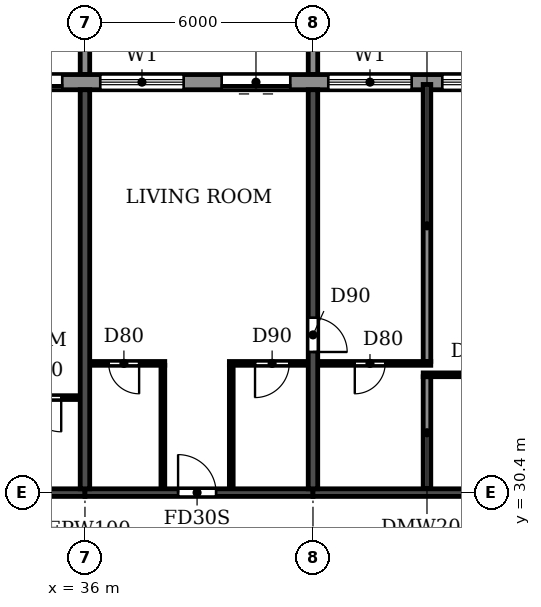
"""IFC4 building model, lengths in metres.
Left out: names, types, materials, properties, quantities, classifications, styles, units other than length and angle.
Written with IfcOpenShell. Run it as: python <this file> out.ifc"""

import sys

from ifc_helpers import new_model, si_unit, direction, frame, frame_2d, origin, place, context, subcontext, project, spatial, polyline, rectangle, outline, extrude, source, transform, mapped, element, fill, save


model = new_model("IFC4")
c1 = context("Model", 3, precision=1e-05, world=origin(), true_north=direction((0.0, 1.0)))
c2 = subcontext(c1, "Body", "Model", "MODEL_VIEW")
j1 = project(units=[si_unit("LENGTHUNIT", "METRE"), si_unit("PLANEANGLEUNIT", "RADIAN")], contexts=[c1])
p1 = place(None, origin())
s1 = spatial("IfcSite", under=j1, at=p1, CompositionType="ELEMENT")
p2 = place(p1, origin())
s2 = spatial("IfcBuilding", under=s1, at=p2, CompositionType="ELEMENT")
p3 = place(p2, frame((0.0, 0.0, 251.1)))
s3 = spatial("IfcBuildingStorey", under=s2, at=p3, CompositionType="ELEMENT", Elevation=251.1)
p4 = place(p3, frame((36.0, 30.5, 0.0), z_axis=(0.0, 0.0, 1.0), x_axis=(0.0, 1.0, 0.0)))
e1 = element("IfcWall", 1, at=p4, inside=s3, PredefinedType="SHEAR", context=c2, shape_type="SweptSolid", body=[
    extrude(rectangle(XDim=10.5, YDim=0.25, at=frame_2d((5.25, 0.0))), origin(), (0.0, 0.0, 1.0), 3.08),
])
p5 = place(p3, frame((42.0, 30.5, 0.0), z_axis=(0.0, 0.0, 1.0), x_axis=(0.0, 1.0, 0.0)))
e2 = element("IfcWall", 2, at=p5, inside=s3, PredefinedType="SHEAR", context=c2, shape_type="SweptSolid", body=[
    extrude(rectangle(XDim=10.5, YDim=0.25, at=frame_2d((5.25, 0.0))), origin(), (0.0, 0.0, 1.0), 3.08),
])
p6 = place(p5, frame((3.6, 0.0, 0.0)))
e3 = element("IfcOpeningElement", 3, at=p6, cuts=e2, PredefinedType="OPENING", context=c2, shape_type="SweptSolid", body=[
    extrude(rectangle(XDim=0.9, YDim=2.1, at=frame_2d((0.45, 1.05))), frame((0.0, 0.135, 0.0), z_axis=(0.0, -1.0, 0.0), x_axis=(1.0, 0.0, 0.0)), (0.0, 0.0, 1.0), 0.27),
])
p7 = place(p3, frame((30.0, 30.4, 0.0), z_axis=(0.0, 0.0, 1.0), x_axis=(1.0, 0.0, 0.0)))
e4 = element("IfcWall", 4, at=p7, inside=s3, PredefinedType="SHEAR", context=c2, shape_type="SweptSolid", body=[
    extrude(rectangle(XDim=6.0, YDim=0.2, at=frame_2d((3.0, 0.0))), origin(), (0.0, 0.0, 1.0), 2.48),
])
p8 = place(p7, frame((2.45, 0.0, 0.0)))
e5 = element("IfcOpeningElement", 5, at=p8, cuts=e4, PredefinedType="OPENING", context=c2, shape_type="SweptSolid", body=[
    extrude(rectangle(XDim=1.0, YDim=2.1, at=frame_2d((0.5, 1.05))), frame((0.0, 0.11, 0.0), z_axis=(0.0, -1.0, 0.0), x_axis=(1.0, 0.0, 0.0)), (0.0, 0.0, 1.0), 0.22),
])
p9 = place(p3, frame((36.0, 30.4, 0.0), z_axis=(0.0, 0.0, 1.0), x_axis=(1.0, 0.0, 0.0)))
e6 = element("IfcWall", 6, at=p9, inside=s3, PredefinedType="SHEAR", context=c2, shape_type="SweptSolid", body=[
    extrude(rectangle(XDim=6.0, YDim=0.2, at=frame_2d((3.0, 0.0))), origin(), (0.0, 0.0, 1.0), 2.48),
])
p10 = place(p9, frame((2.45, 0.0, 0.0)))
e7 = element("IfcOpeningElement", 7, at=p10, cuts=e6, PredefinedType="OPENING", context=c2, shape_type="SweptSolid", body=[
    extrude(rectangle(XDim=1.0, YDim=2.1, at=frame_2d((0.5, 1.05))), frame((0.0, 0.11, 0.0), z_axis=(0.0, -1.0, 0.0), x_axis=(1.0, 0.0, 0.0)), (0.0, 0.0, 1.0), 0.22),
])
p11 = place(p3, frame((42.0, 30.4, 0.0), z_axis=(0.0, 0.0, 1.0), x_axis=(1.0, 0.0, 0.0)))
e8 = element("IfcWall", 8, at=p11, inside=s3, PredefinedType="SHEAR", context=c2, shape_type="SweptSolid", body=[
    extrude(rectangle(XDim=6.0, YDim=0.2, at=frame_2d((3.0, 0.0))), origin(), (0.0, 0.0, 1.0), 2.48),
])
p12 = place(p3, frame((79.317, 41.2, 0.0), z_axis=(0.0, 0.0, 1.0), x_axis=(-1.0, 0.0, 0.0)))
e9 = element("IfcWall", 9, at=p12, inside=s3, PredefinedType="STANDARD", context=c2, shape_type="SweptSolid", body=[
    extrude(rectangle(XDim=56.634, YDim=0.4, at=frame_2d((28.317, 0.0))), origin(), (0.0, 0.0, 1.0), 3.08),
])
p13 = place(p12, frame((52.717, 0.0, 0.9)))
e10 = element("IfcOpeningElement", 10, at=p13, cuts=e9, PredefinedType="OPENING", context=c2, shape_type="SweptSolid", body=[
    extrude(rectangle(XDim=2.2, YDim=1.5, at=frame_2d((1.1, 0.75))), frame((0.0, 0.21, 0.0), z_axis=(0.0, -1.0, 0.0), x_axis=(1.0, 0.0, 0.0)), (0.0, 0.0, 1.0), 0.42),
])
p14 = place(p12, frame((49.717, 0.0, 0.9)))
e11 = element("IfcOpeningElement", 11, at=p14, cuts=e9, PredefinedType="OPENING", context=c2, shape_type="SweptSolid", body=[
    extrude(rectangle(XDim=2.2, YDim=1.5, at=frame_2d((1.1, 0.75))), frame((0.0, 0.21, 0.0), z_axis=(0.0, -1.0, 0.0), x_axis=(1.0, 0.0, 0.0)), (0.0, 0.0, 1.0), 0.42),
])
p15 = place(p12, frame((46.717, 0.0, 0.9)))
e12 = element("IfcOpeningElement", 12, at=p15, cuts=e9, PredefinedType="OPENING", context=c2, shape_type="SweptSolid", body=[
    extrude(rectangle(XDim=2.2, YDim=1.5, at=frame_2d((1.1, 0.75))), frame((0.0, 0.21, 0.0), z_axis=(0.0, -1.0, 0.0), x_axis=(1.0, 0.0, 0.0)), (0.0, 0.0, 1.0), 0.42),
])
p16 = place(p12, frame((43.917, 0.0, 0.0)))
e13 = element("IfcOpeningElement", 13, at=p16, cuts=e9, PredefinedType="OPENING", context=c2, shape_type="SweptSolid", body=[
    extrude(rectangle(XDim=1.8, YDim=2.4, at=frame_2d((0.9, 1.2))), frame((0.0, 0.21, 0.0), z_axis=(0.0, -1.0, 0.0), x_axis=(1.0, 0.0, 0.0)), (0.0, 0.0, 1.0), 0.42),
])
p17 = place(p12, frame((40.717, 0.0, 0.9)))
e14 = element("IfcOpeningElement", 14, at=p17, cuts=e9, PredefinedType="OPENING", context=c2, shape_type="SweptSolid", body=[
    extrude(rectangle(XDim=2.2, YDim=1.5, at=frame_2d((1.1, 0.75))), frame((0.0, 0.21, 0.0), z_axis=(0.0, -1.0, 0.0), x_axis=(1.0, 0.0, 0.0)), (0.0, 0.0, 1.0), 0.42),
])
p18 = place(p12, frame((37.917, 0.0, 0.0)))
e15 = element("IfcOpeningElement", 15, at=p18, cuts=e9, PredefinedType="OPENING", context=c2, shape_type="SweptSolid", body=[
    extrude(rectangle(XDim=1.8, YDim=2.4, at=frame_2d((0.9, 1.2))), frame((0.0, 0.21, 0.0), z_axis=(0.0, -1.0, 0.0), x_axis=(1.0, 0.0, 0.0)), (0.0, 0.0, 1.0), 0.42),
])
p19 = place(p12, frame((34.717, 0.0, 0.9)))
e16 = element("IfcOpeningElement", 16, at=p19, cuts=e9, PredefinedType="OPENING", context=c2, shape_type="SweptSolid", body=[
    extrude(rectangle(XDim=2.2, YDim=1.5, at=frame_2d((1.1, 0.75))), frame((0.0, 0.21, 0.0), z_axis=(0.0, -1.0, 0.0), x_axis=(1.0, 0.0, 0.0)), (0.0, 0.0, 1.0), 0.42),
])
p20 = place(p12, frame((31.717, 0.0, 0.9)))
e17 = element("IfcOpeningElement", 17, at=p20, cuts=e9, PredefinedType="OPENING", context=c2, shape_type="SweptSolid", body=[
    extrude(rectangle(XDim=2.2, YDim=1.5, at=frame_2d((1.1, 0.75))), frame((0.0, 0.21, 0.0), z_axis=(0.0, -1.0, 0.0), x_axis=(1.0, 0.0, 0.0)), (0.0, 0.0, 1.0), 0.42),
])
p21 = place(p12, frame((28.717, 0.0, 0.9)))
e18 = element("IfcOpeningElement", 18, at=p21, cuts=e9, PredefinedType="OPENING", context=c2, shape_type="SweptSolid", body=[
    extrude(rectangle(XDim=2.2, YDim=1.5, at=frame_2d((1.1, 0.75))), frame((0.0, 0.21, 0.0), z_axis=(0.0, -1.0, 0.0), x_axis=(1.0, 0.0, 0.0)), (0.0, 0.0, 1.0), 0.42),
])
p22 = place(p12, frame((25.917, 0.0, 0.0)))
e19 = element("IfcOpeningElement", 19, at=p22, cuts=e9, PredefinedType="OPENING", context=c2, shape_type="SweptSolid", body=[
    extrude(rectangle(XDim=1.8, YDim=2.4, at=frame_2d((0.9, 1.2))), frame((0.0, 0.21, 0.0), z_axis=(0.0, -1.0, 0.0), x_axis=(1.0, 0.0, 0.0)), (0.0, 0.0, 1.0), 0.42),
])
p23 = place(p12, frame((22.917, 0.0, 0.0)))
e20 = element("IfcOpeningElement", 20, at=p23, cuts=e9, PredefinedType="OPENING", context=c2, shape_type="SweptSolid", body=[
    extrude(rectangle(XDim=1.8, YDim=2.4, at=frame_2d((0.9, 1.2))), frame((0.0, 0.21, 0.0), z_axis=(0.0, -1.0, 0.0), x_axis=(1.0, 0.0, 0.0)), (0.0, 0.0, 1.0), 0.42),
])
p24 = place(p12, frame((19.717, 0.0, 0.9)))
e21 = element("IfcOpeningElement", 21, at=p24, cuts=e9, PredefinedType="OPENING", context=c2, shape_type="SweptSolid", body=[
    extrude(rectangle(XDim=2.2, YDim=1.5, at=frame_2d((1.1, 0.75))), frame((0.0, 0.21, 0.0), z_axis=(0.0, -1.0, 0.0), x_axis=(1.0, 0.0, 0.0)), (0.0, 0.0, 1.0), 0.42),
])
p25 = place(p12, frame((16.717, 0.0, 0.9)))
e22 = element("IfcOpeningElement", 22, at=p25, cuts=e9, PredefinedType="OPENING", context=c2, shape_type="SweptSolid", body=[
    extrude(rectangle(XDim=2.2, YDim=1.5, at=frame_2d((1.1, 0.75))), frame((0.0, 0.21, 0.0), z_axis=(0.0, -1.0, 0.0), x_axis=(1.0, 0.0, 0.0)), (0.0, 0.0, 1.0), 0.42),
])
p26 = place(p12, frame((13.717, 0.0, 0.9)))
e23 = element("IfcOpeningElement", 23, at=p26, cuts=e9, PredefinedType="OPENING", context=c2, shape_type="SweptSolid", body=[
    extrude(rectangle(XDim=2.2, YDim=1.5, at=frame_2d((1.1, 0.75))), frame((0.0, 0.21, 0.0), z_axis=(0.0, -1.0, 0.0), x_axis=(1.0, 0.0, 0.0)), (0.0, 0.0, 1.0), 0.42),
])
p27 = place(p12, frame((10.717, 0.0, 0.9)))
e24 = element("IfcOpeningElement", 24, at=p27, cuts=e9, PredefinedType="OPENING", context=c2, shape_type="SweptSolid", body=[
    extrude(rectangle(XDim=2.2, YDim=1.5, at=frame_2d((1.1, 0.75))), frame((0.0, 0.21, 0.0), z_axis=(0.0, -1.0, 0.0), x_axis=(1.0, 0.0, 0.0)), (0.0, 0.0, 1.0), 0.42),
])
p28 = place(p12, frame((7.917, 0.0, 0.0)))
e25 = element("IfcOpeningElement", 25, at=p28, cuts=e9, PredefinedType="OPENING", context=c2, shape_type="SweptSolid", body=[
    extrude(rectangle(XDim=1.8, YDim=2.4, at=frame_2d((0.9, 1.2))), frame((0.0, 0.21, 0.0), z_axis=(0.0, -1.0, 0.0), x_axis=(1.0, 0.0, 0.0)), (0.0, 0.0, 1.0), 0.42),
])
p29 = place(p12, frame((4.717, 0.0, 0.9)))
e26 = element("IfcOpeningElement", 26, at=p29, cuts=e9, PredefinedType="OPENING", context=c2, shape_type="SweptSolid", body=[
    extrude(rectangle(XDim=2.2, YDim=1.5, at=frame_2d((1.1, 0.75))), frame((0.0, 0.21, 0.0), z_axis=(0.0, -1.0, 0.0), x_axis=(1.0, 0.0, 0.0)), (0.0, 0.0, 1.0), 0.42),
])
p30 = place(p12, frame((1.917, 0.0, 0.0)))
e27 = element("IfcOpeningElement", 27, at=p30, cuts=e9, PredefinedType="OPENING", context=c2, shape_type="SweptSolid", body=[
    extrude(rectangle(XDim=1.8, YDim=2.4, at=frame_2d((0.9, 1.2))), frame((0.0, 0.21, 0.0), z_axis=(0.0, -1.0, 0.0), x_axis=(1.0, 0.0, 0.0)), (0.0, 0.0, 1.0), 0.42),
])
m1 = source(origin(), c2, "Body", "SweptSolid", [
    extrude(outline(polyline([(0.0, 0.0), (0.25, 0.0), (0.25, 3.1), (0.0, 3.1), (0.0, 0.0)])), origin(), (0.0, 0.0, 1.0), 3.1),
])
for number, where in (
    (28, (35.875, 41.4, 0.0)),
    (29, (41.875, 41.4, 0.0)),
):
    element("IfcWall", number, at=place(p3, frame(where)), inside=s3, PredefinedType="STANDARD", context=c2, shape_type="MappedRepresentation", body=[
        mapped(m1, transform((0.0, 0.0, 0.0))),
    ])
p31 = place(p3, frame((45.0, 30.51, 0.0), z_axis=(0.0, 0.0, 1.0), x_axis=(0.0, 1.0, 0.0)))
e30 = element("IfcWall", 30, at=p31, inside=s3, PredefinedType="PARTITIONING", context=c2, shape_type="SweptSolid", body=[
    extrude(rectangle(XDim=2.94, YDim=0.2, at=frame_2d((1.47, 0.0))), origin(), (0.0, 0.0, 1.0), 3.08),
])
p32 = place(p3, frame((45.0, 33.85, 0.0), z_axis=(0.0, 0.0, 1.0), x_axis=(0.0, 1.0, 0.0)))
e31 = element("IfcWall", 31, at=p32, inside=s3, PredefinedType="PARTITIONING", context=c2, shape_type="SweptSolid", body=[
    extrude(rectangle(XDim=7.29, YDim=0.2, at=frame_2d((3.645, 0.0))), origin(), (0.0, 0.0, 1.0), 3.08),
])
p33 = place(p3, frame((33.8, 32.9, 0.0), z_axis=(0.0, 0.0, 1.0), x_axis=(1.0, 0.0, 0.0)))
e32 = element("IfcWall", 32, at=p33, inside=s3, PredefinedType="PARTITIONING", context=c2, shape_type="SweptSolid", body=[
    extrude(rectangle(XDim=2.065, YDim=0.1, at=frame_2d((1.032, 0.0))), origin(), (0.0, 0.0, 1.0), 3.08),
])
p34 = place(p33, frame((0.675, 0.0, 0.0)))
e33 = element("IfcOpeningElement", 33, at=p34, cuts=e32, PredefinedType="OPENING", context=c2, shape_type="SweptSolid", body=[
    extrude(rectangle(XDim=0.9, YDim=2.1, at=frame_2d((0.45, 1.05))), frame((0.0, 0.06, 0.0), z_axis=(0.0, -1.0, 0.0), x_axis=(1.0, 0.0, 0.0)), (0.0, 0.0, 1.0), 0.12),
])
p35 = place(p3, frame((44.9, 33.5, 0.0), z_axis=(0.0, 0.0, 1.0), x_axis=(1.0, 0.0, 0.0)))
e34 = element("IfcWall", 34, at=p35, inside=s3, PredefinedType="PARTITIONING", context=c2, shape_type="SweptSolid", body=[
    extrude(rectangle(XDim=2.965, YDim=0.1, at=frame_2d((1.482, 0.0))), origin(), (0.0, 0.0, 1.0), 3.08),
])
p36 = place(p35, frame((1.2, 0.0, 0.0)))
e35 = element("IfcOpeningElement", 35, at=p36, cuts=e34, PredefinedType="OPENING", context=c2, shape_type="SweptSolid", body=[
    extrude(rectangle(XDim=0.8, YDim=2.1, at=frame_2d((0.4, 1.05))), frame((0.0, 0.06, 0.0), z_axis=(0.0, -1.0, 0.0), x_axis=(1.0, 0.0, 0.0)), (0.0, 0.0, 1.0), 0.12),
])
p37 = place(p3, frame((36.135, 33.8, 0.0), z_axis=(0.0, 0.0, 1.0), x_axis=(1.0, 0.0, 0.0)))
e36 = element("IfcWall", 36, at=p37, inside=s3, PredefinedType="PARTITIONING", context=c2, shape_type="SweptSolid", body=[
    extrude(rectangle(XDim=1.965, YDim=0.1, at=frame_2d((0.982, 0.0))), origin(), (0.0, 0.0, 1.0), 3.08),
])
p38 = place(p37, frame((0.49, 0.0, 0.0)))
e37 = element("IfcOpeningElement", 37, at=p38, cuts=e36, PredefinedType="OPENING", context=c2, shape_type="SweptSolid", body=[
    extrude(rectangle(XDim=0.8, YDim=2.1, at=frame_2d((0.4, 1.05))), frame((0.0, 0.06, 0.0), z_axis=(0.0, -1.0, 0.0), x_axis=(1.0, 0.0, 0.0)), (0.0, 0.0, 1.0), 0.12),
])
p39 = place(p3, frame((39.8, 33.8, 0.0), z_axis=(0.0, 0.0, 1.0), x_axis=(1.0, 0.0, 0.0)))
e38 = element("IfcWall", 38, at=p39, inside=s3, PredefinedType="PARTITIONING", context=c2, shape_type="SweptSolid", body=[
    extrude(rectangle(XDim=2.065, YDim=0.1, at=frame_2d((1.032, 0.0))), origin(), (0.0, 0.0, 1.0), 3.08),
])
p40 = place(p39, frame((0.675, 0.0, 0.0)))
e39 = element("IfcOpeningElement", 39, at=p40, cuts=e38, PredefinedType="OPENING", context=c2, shape_type="SweptSolid", body=[
    extrude(rectangle(XDim=0.9, YDim=2.1, at=frame_2d((0.45, 1.05))), frame((0.0, 0.06, 0.0), z_axis=(0.0, -1.0, 0.0), x_axis=(1.0, 0.0, 0.0)), (0.0, 0.0, 1.0), 0.12),
])
p41 = place(p3, frame((42.135, 33.8, 0.0), z_axis=(0.0, 0.0, 1.0), x_axis=(1.0, 0.0, 0.0)))
e40 = element("IfcWall", 40, at=p41, inside=s3, PredefinedType="PARTITIONING", context=c2, shape_type="SweptSolid", body=[
    extrude(rectangle(XDim=2.965, YDim=0.1, at=frame_2d((1.482, 0.0))), origin(), (0.0, 0.0, 1.0), 3.08),
])
p42 = place(p41, frame((0.965, 0.0, 0.0)))
e41 = element("IfcOpeningElement", 41, at=p42, cuts=e40, PredefinedType="OPENING", context=c2, shape_type="SweptSolid", body=[
    extrude(rectangle(XDim=0.8, YDim=2.1, at=frame_2d((0.4, 1.05))), frame((0.0, 0.06, 0.0), z_axis=(0.0, -1.0, 0.0), x_axis=(1.0, 0.0, 0.0)), (0.0, 0.0, 1.0), 0.12),
])
for number, where, z_axis, x_axis in (
    (42, (38.05, 30.51, 0.0), (0.0, 0.0, 1.0), (0.0, 1.0, 0.0)),
    (43, (39.85, 30.51, 0.0), (0.0, 0.0, 1.0), (0.0, 1.0, 0.0)),
):
    element("IfcWall", number, at=place(p3, frame(where, z_axis=z_axis, x_axis=x_axis)), inside=s3, PredefinedType="PARTITIONING", context=c2, shape_type="SweptSolid", body=[
        extrude(rectangle(XDim=3.24, YDim=0.1, at=frame_2d((1.62, 0.0))), origin(), (0.0, 0.0, 1.0), 3.08),
    ])
p43 = place(p16, origin())
e44 = element("IfcDoor", 44, at=p43, inside=s3, OperationType="DOUBLE_DOOR_SLIDING", PredefinedType="DOOR", context=c2, shape_type="SweptSolid", body=[
    extrude(rectangle(XDim=1.8, YDim=2.4, at=frame_2d((0.9, 1.2))), frame((0.0, 0.025, 0.0), z_axis=(0.0, -1.0, 0.0), x_axis=(1.0, 0.0, 0.0)), (0.0, 0.0, 1.0), 0.05),
])
fill(e13, e44)
p44 = place(p17, origin())
e45 = element("IfcWindow", 45, at=p44, inside=s3, PartitioningType="DOUBLE_PANEL_HORIZONTAL", PredefinedType="WINDOW", context=c2, shape_type="SweptSolid", body=[
    extrude(rectangle(XDim=2.2, YDim=1.5, at=frame_2d((1.1, 0.75))), frame((0.0, 0.03, 0.0), z_axis=(0.0, -1.0, 0.0), x_axis=(1.0, 0.0, 0.0)), (0.0, 0.0, 1.0), 0.06),
])
fill(e14, e45)
p45 = place(p18, origin())
e46 = element("IfcDoor", 46, at=p45, inside=s3, OperationType="DOUBLE_DOOR_SLIDING", PredefinedType="DOOR", context=c2, shape_type="SweptSolid", body=[
    extrude(rectangle(XDim=1.8, YDim=2.4, at=frame_2d((0.9, 1.2))), frame((0.0, 0.025, 0.0), z_axis=(0.0, -1.0, 0.0), x_axis=(1.0, 0.0, 0.0)), (0.0, 0.0, 1.0), 0.05),
])
fill(e15, e46)
p46 = place(p19, origin())
e47 = element("IfcWindow", 47, at=p46, inside=s3, PartitioningType="DOUBLE_PANEL_HORIZONTAL", PredefinedType="WINDOW", context=c2, shape_type="SweptSolid", body=[
    extrude(rectangle(XDim=2.2, YDim=1.5, at=frame_2d((1.1, 0.75))), frame((0.0, 0.03, 0.0), z_axis=(0.0, -1.0, 0.0), x_axis=(1.0, 0.0, 0.0)), (0.0, 0.0, 1.0), 0.06),
])
fill(e16, e47)
p47 = place(p20, origin())
e48 = element("IfcWindow", 48, at=p47, inside=s3, PartitioningType="DOUBLE_PANEL_HORIZONTAL", PredefinedType="WINDOW", context=c2, shape_type="SweptSolid", body=[
    extrude(rectangle(XDim=2.2, YDim=1.5, at=frame_2d((1.1, 0.75))), frame((0.0, 0.03, 0.0), z_axis=(0.0, -1.0, 0.0), x_axis=(1.0, 0.0, 0.0)), (0.0, 0.0, 1.0), 0.06),
])
fill(e17, e48)
p48 = place(p34, frame((0.9, 0.0, 0.0), z_axis=(0.0, 0.0, 1.0), x_axis=(-1.0, 0.0, 0.0)))
e49 = element("IfcDoor", 49, at=p48, inside=s3, OperationType="SINGLE_SWING_LEFT", PredefinedType="DOOR", context=c2, shape_type="SweptSolid", body=[
    extrude(rectangle(XDim=0.9, YDim=2.1, at=frame_2d((0.45, 1.05))), frame((0.0, 0.025, 0.0), z_axis=(0.0, -1.0, 0.0), x_axis=(1.0, 0.0, 0.0)), (0.0, 0.0, 1.0), 0.05),
])
fill(e33, e49)
p49 = place(p42, frame((0.8, 0.0, 0.0), z_axis=(0.0, 0.0, 1.0), x_axis=(-1.0, 0.0, 0.0)))
e50 = element("IfcDoor", 50, at=p49, inside=s3, OperationType="SINGLE_SWING_RIGHT", PredefinedType="DOOR", context=c2, shape_type="SweptSolid", body=[
    extrude(rectangle(XDim=0.8, YDim=2.1, at=frame_2d((0.4, 1.05))), frame((0.0, 0.025, 0.0), z_axis=(0.0, -1.0, 0.0), x_axis=(1.0, 0.0, 0.0)), (0.0, 0.0, 1.0), 0.05),
])
fill(e41, e50)
p50 = place(p38, frame((0.8, 0.0, 0.0), z_axis=(0.0, 0.0, 1.0), x_axis=(-1.0, 0.0, 0.0)))
e51 = element("IfcDoor", 51, at=p50, inside=s3, OperationType="SINGLE_SWING_LEFT", PredefinedType="DOOR", context=c2, shape_type="SweptSolid", body=[
    extrude(rectangle(XDim=0.8, YDim=2.1, at=frame_2d((0.4, 1.05))), frame((0.0, 0.025, 0.0), z_axis=(0.0, -1.0, 0.0), x_axis=(1.0, 0.0, 0.0)), (0.0, 0.0, 1.0), 0.05),
])
fill(e37, e51)
p51 = place(p10, origin())
e52 = element("IfcDoor", 52, at=p51, inside=s3, OperationType="SINGLE_SWING_LEFT", PredefinedType="DOOR", context=c2, shape_type="SweptSolid", body=[
    extrude(rectangle(XDim=1.0, YDim=2.1, at=frame_2d((0.5, 1.05))), frame((0.0, 0.025, 0.0), z_axis=(0.0, -1.0, 0.0), x_axis=(1.0, 0.0, 0.0)), (0.0, 0.0, 1.0), 0.05),
])
fill(e7, e52)
p52 = place(p40, frame((0.9, 0.0, 0.0), z_axis=(0.0, 0.0, 1.0), x_axis=(-1.0, 0.0, 0.0)))
e53 = element("IfcDoor", 53, at=p52, inside=s3, OperationType="SINGLE_SWING_RIGHT", PredefinedType="DOOR", context=c2, shape_type="SweptSolid", body=[
    extrude(rectangle(XDim=0.9, YDim=2.1, at=frame_2d((0.45, 1.05))), frame((0.0, 0.025, 0.0), z_axis=(0.0, -1.0, 0.0), x_axis=(1.0, 0.0, 0.0)), (0.0, 0.0, 1.0), 0.05),
])
fill(e39, e53)
p53 = place(p6, frame((0.9, 0.0, 0.0), z_axis=(0.0, 0.0, 1.0), x_axis=(-1.0, 0.0, 0.0)))
e54 = element("IfcDoor", 54, at=p53, inside=s3, OperationType="SINGLE_SWING_RIGHT", PredefinedType="DOOR", context=c2, shape_type="SweptSolid", body=[
    extrude(rectangle(XDim=0.9, YDim=2.1, at=frame_2d((0.45, 1.05))), frame((0.0, 0.025, 0.0), z_axis=(0.0, -1.0, 0.0), x_axis=(1.0, 0.0, 0.0)), (0.0, 0.0, 1.0), 0.05),
])
fill(e3, e54)
save(model, sys.argv[1])
